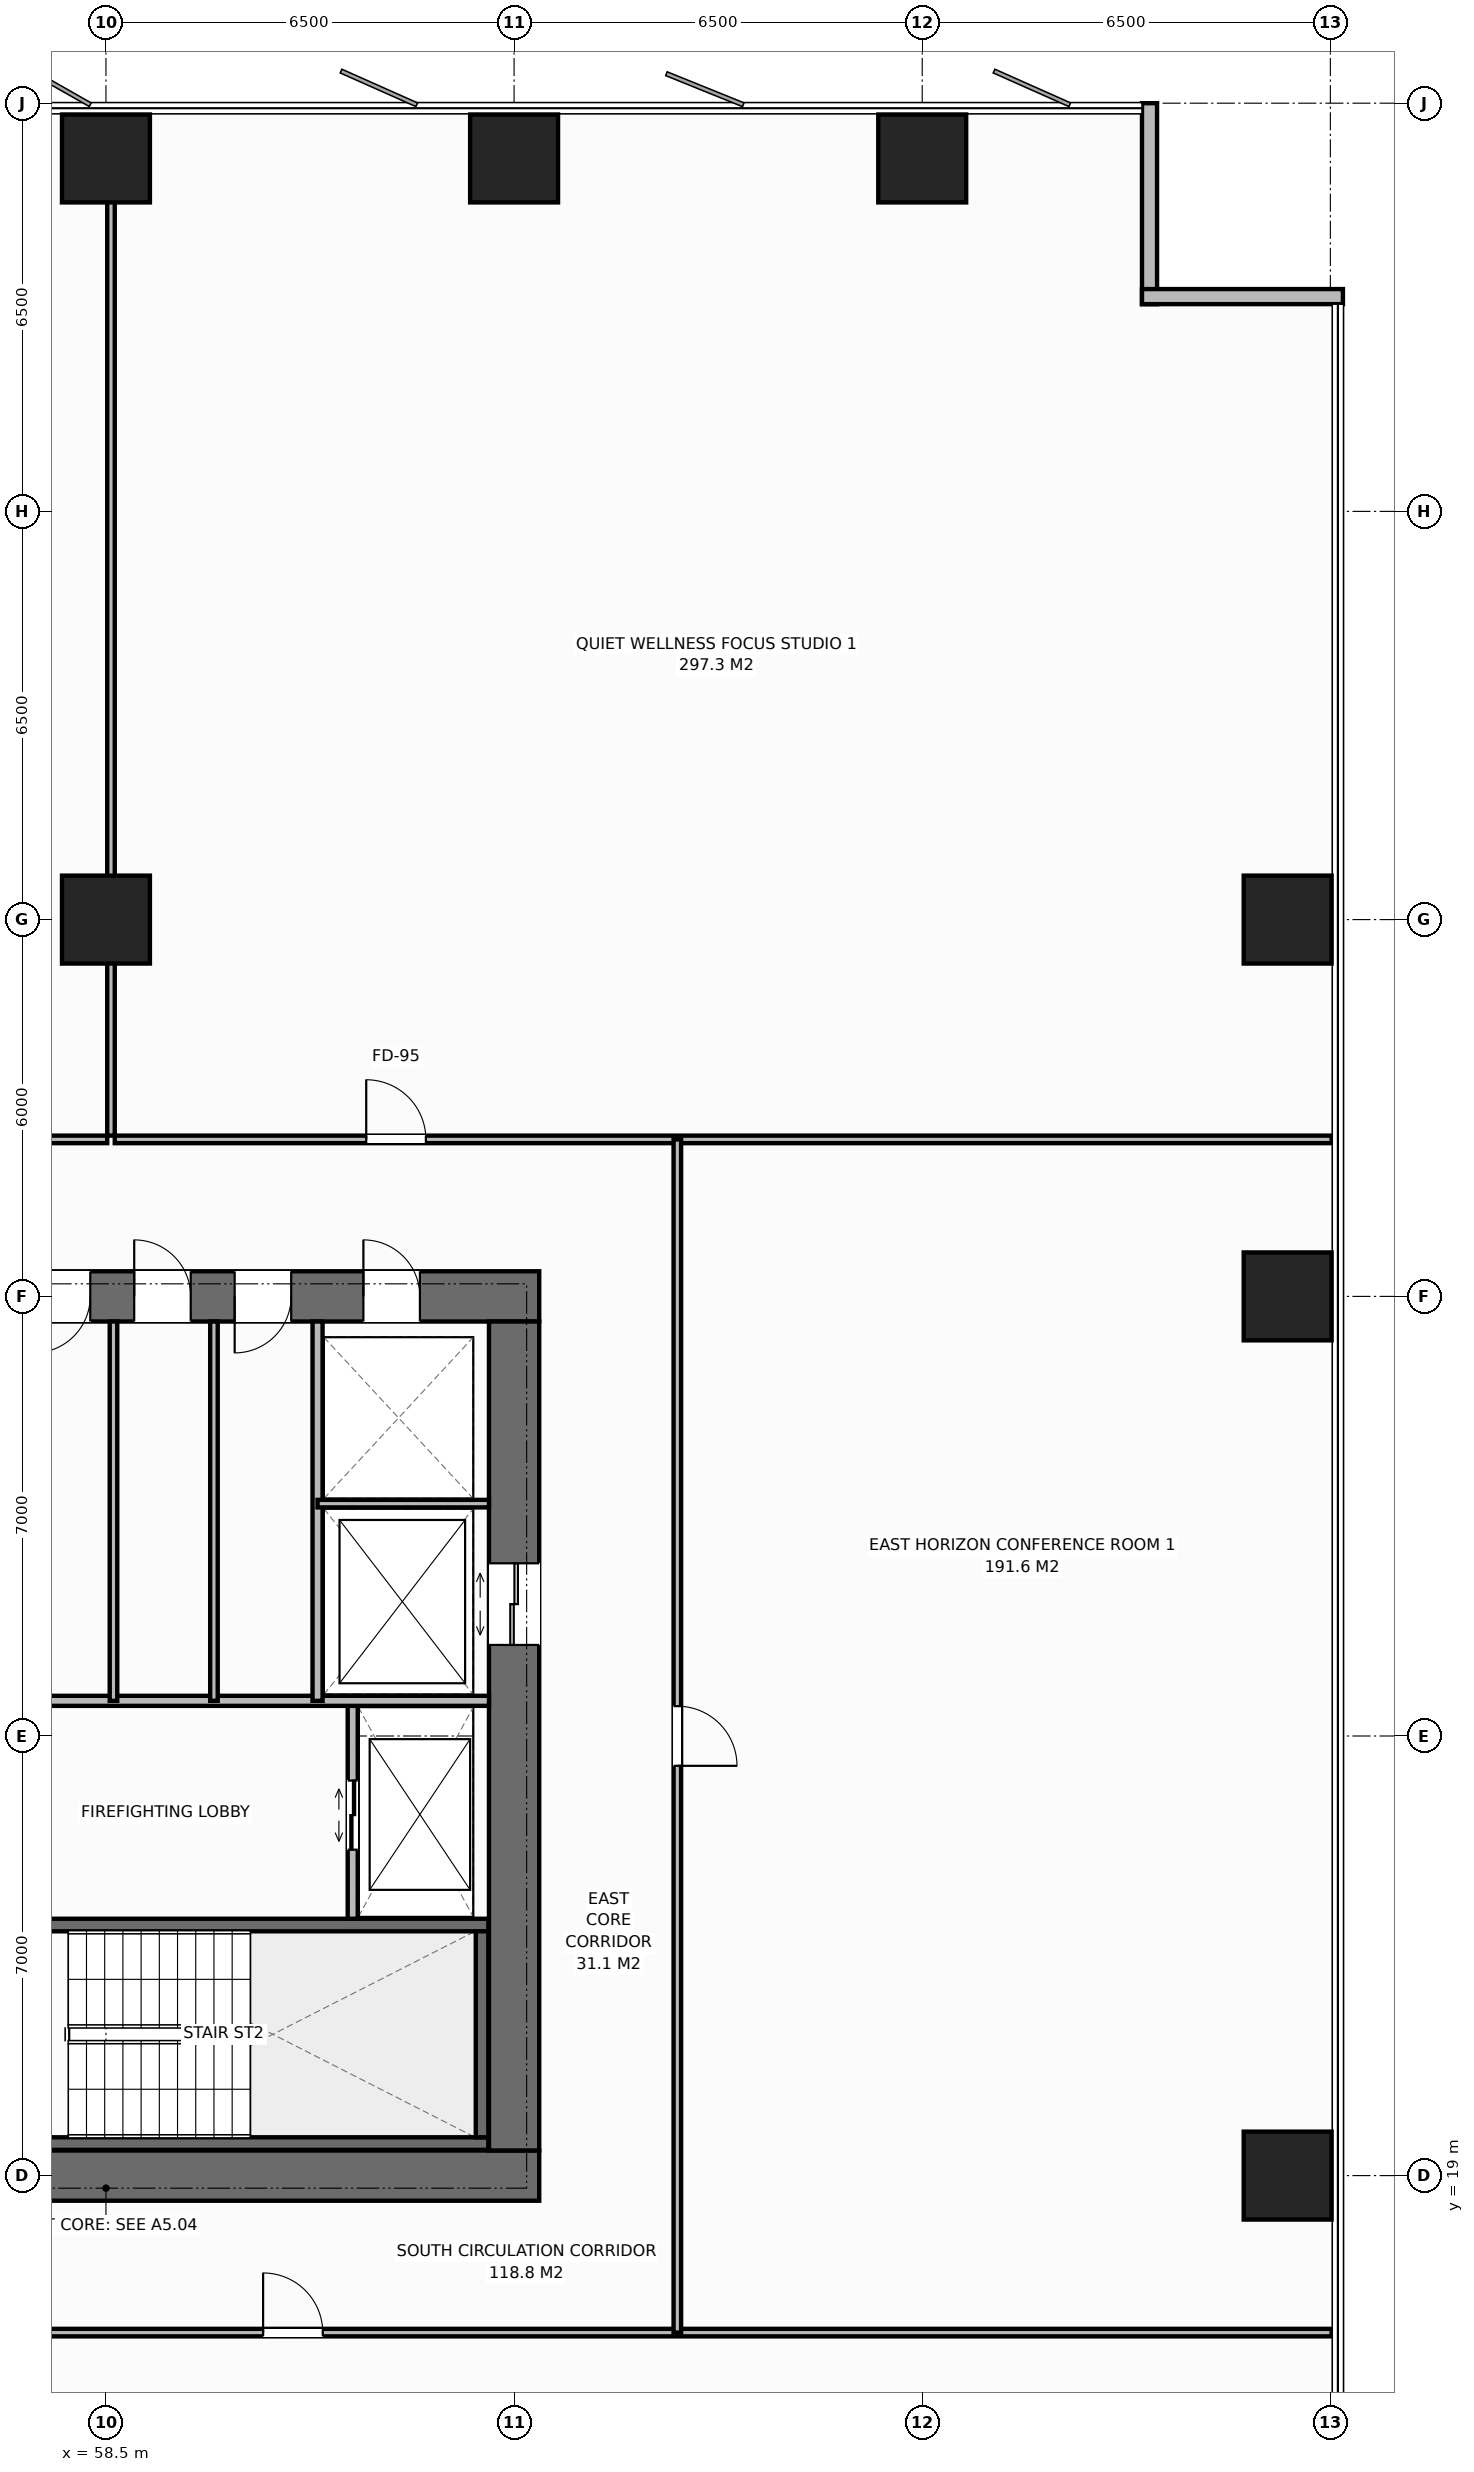
"""IFC4 building model, lengths in metres.
Left out: names, types, materials, properties, quantities, classifications, styles, units other than length and angle.
Written with IfcOpenShell. Run it as: python <this file> out.ifc"""

import sys

from ifc_helpers import new_model, si_unit, direction, frame, frame_2d, origin, origin_2d, place, context, subcontext, project, spatial, rectangle, extrude, element, fill, save


model = new_model("IFC4")
c1 = context("Model", 3, precision=1e-05, world=origin(), true_north=direction((0.0, 1.0)))
c2 = subcontext(c1, "Body", "Model", "MODEL_VIEW")
j1 = project(units=[si_unit("LENGTHUNIT", "METRE"), si_unit("PLANEANGLEUNIT", "RADIAN")], contexts=[c1])
p1 = place(None, origin())
s1 = spatial("IfcSite", under=j1, at=p1, CompositionType="ELEMENT")
p2 = place(p1, origin())
s2 = spatial("IfcBuilding", under=s1, at=p2, CompositionType="ELEMENT")
p3 = place(p2, frame((0.0, 0.0, 39.2)))
s3 = spatial("IfcBuildingStorey", under=s2, at=p3, CompositionType="ELEMENT", Elevation=39.2)
p4 = place(p3, frame((51.6, 19.0, 0.0), z_axis=(0.0, 0.0, 1.0), x_axis=(1.0, 0.0, 0.0)))
e1 = element("IfcWall", 1, at=p4, inside=s3, PredefinedType="SHEAR", context=c2, shape_type="SweptSolid", body=[
    extrude(rectangle(XDim=13.8, YDim=0.8, at=frame_2d((6.9, 0.0))), origin(), (0.0, 0.0, 1.0), 3.8),
])
p5 = place(p4, frame((3.12, 0.0, 0.0)))
e2 = element("IfcOpeningElement", 2, at=p5, cuts=e1, PredefinedType="OPENING", context=c2, shape_type="SweptSolid", body=[
    extrude(rectangle(XDim=1.4, YDim=2.2, at=frame_2d((0.7, 1.1))), frame((0.0, 0.41, 0.0), z_axis=(0.0, -1.0, 0.0), x_axis=(1.0, 0.0, 0.0)), (0.0, 0.0, 1.0), 0.82),
])
p6 = place(p3, frame((51.6, 33.0, 0.0), z_axis=(0.0, 0.0, 1.0), x_axis=(1.0, 0.0, 0.0)))
e3 = element("IfcWall", 3, at=p6, inside=s3, PredefinedType="SHEAR", context=c2, shape_type="SweptSolid", body=[
    extrude(rectangle(XDim=13.8, YDim=0.8, at=frame_2d((6.9, 0.0))), origin(), (0.0, 0.0, 1.0), 3.8),
])
p7 = place(p6, frame((3.12, 0.0, 0.0)))
e4 = element("IfcOpeningElement", 4, at=p7, cuts=e3, PredefinedType="OPENING", context=c2, shape_type="SweptSolid", body=[
    extrude(rectangle(XDim=1.4, YDim=2.2, at=frame_2d((0.7, 1.1))), frame((0.0, 0.41, 0.0), z_axis=(0.0, -1.0, 0.0), x_axis=(1.0, 0.0, 0.0)), (0.0, 0.0, 1.0), 0.82),
])
p8 = place(p6, frame((11.0, 0.0, 0.0)))
e5 = element("IfcOpeningElement", 5, at=p8, cuts=e3, PredefinedType="OPENING", context=c2, shape_type="SweptSolid", body=[
    extrude(rectangle(XDim=0.9, YDim=2.15, at=frame_2d((0.45, 1.075))), frame((0.0, 0.41, 0.0), z_axis=(0.0, -1.0, 0.0), x_axis=(1.0, 0.0, 0.0)), (0.0, 0.0, 1.0), 0.82),
])
p9 = place(p6, frame((5.75, 0.0, 0.0)))
e6 = element("IfcOpeningElement", 6, at=p9, cuts=e3, PredefinedType="OPENING", context=c2, shape_type="SweptSolid", body=[
    extrude(rectangle(XDim=0.9, YDim=2.15, at=frame_2d((0.45, 1.075))), frame((0.0, 0.41, 0.0), z_axis=(0.0, -1.0, 0.0), x_axis=(1.0, 0.0, 0.0)), (0.0, 0.0, 1.0), 0.82),
])
p10 = place(p6, frame((7.35, 0.0, 0.0)))
e7 = element("IfcOpeningElement", 7, at=p10, cuts=e3, PredefinedType="OPENING", context=c2, shape_type="SweptSolid", body=[
    extrude(rectangle(XDim=0.9, YDim=2.15, at=frame_2d((0.45, 1.075))), frame((0.0, 0.41, 0.0), z_axis=(0.0, -1.0, 0.0), x_axis=(1.0, 0.0, 0.0)), (0.0, 0.0, 1.0), 0.82),
])
p11 = place(p6, frame((8.95, 0.0, 0.0)))
e8 = element("IfcOpeningElement", 8, at=p11, cuts=e3, PredefinedType="OPENING", context=c2, shape_type="SweptSolid", body=[
    extrude(rectangle(XDim=0.9, YDim=2.15, at=frame_2d((0.45, 1.075))), frame((0.0, 0.41, 0.0), z_axis=(0.0, -1.0, 0.0), x_axis=(1.0, 0.0, 0.0)), (0.0, 0.0, 1.0), 0.82),
])
p12 = place(p3, frame((65.0, 19.4, 0.0), z_axis=(0.0, 0.0, 1.0), x_axis=(0.0, 1.0, 0.0)))
e9 = element("IfcWall", 9, at=p12, inside=s3, PredefinedType="SHEAR", context=c2, shape_type="SweptSolid", body=[
    extrude(rectangle(XDim=13.2, YDim=0.8, at=frame_2d((6.6, 0.0))), origin(), (0.0, 0.0, 1.0), 3.8),
])
p13 = place(p12, frame((8.05, 0.0, 0.0)))
e10 = element("IfcOpeningElement", 10, at=p13, cuts=e9, PredefinedType="OPENING", context=c2, shape_type="SweptSolid", body=[
    extrude(rectangle(XDim=1.3, YDim=2.2, at=frame_2d((0.65, 1.1))), frame((0.0, 0.41, 0.0), z_axis=(0.0, -1.0, 0.0), x_axis=(1.0, 0.0, 0.0)), (0.0, 0.0, 1.0), 0.82),
])
p14 = place(p3, frame((56.16, 19.51, 0.0), z_axis=(0.0, 0.0, 1.0), x_axis=(1.0, 0.0, 0.0)))
e11 = element("IfcWall", 11, at=p14, inside=s3, PredefinedType="SHEAR", context=c2, shape_type="SweptSolid", body=[
    extrude(rectangle(XDim=8.43, YDim=0.2, at=frame_2d((4.215, 0.0))), origin(), (0.0, 0.0, 1.0), 3.8),
])
p15 = place(p3, frame((56.16, 22.99, 0.0), z_axis=(0.0, 0.0, 1.0), x_axis=(1.0, 0.0, 0.0)))
e12 = element("IfcWall", 12, at=p15, inside=s3, PredefinedType="SHEAR", context=c2, shape_type="SweptSolid", body=[
    extrude(rectangle(XDim=8.43, YDim=0.2, at=frame_2d((4.215, 0.0))), origin(), (0.0, 0.0, 1.0), 3.8),
])
p16 = place(p15, frame((0.45, 0.0, 0.0)))
e13 = element("IfcOpeningElement", 13, at=p16, cuts=e12, PredefinedType="OPENING", context=c2, shape_type="SweptSolid", body=[
    extrude(rectangle(XDim=1.0, YDim=2.15, at=frame_2d((0.5, 1.075))), frame((0.0, 0.11, 0.0), z_axis=(0.0, -1.0, 0.0), x_axis=(1.0, 0.0, 0.0)), (0.0, 0.0, 1.0), 0.22),
])
p17 = place(p3, frame((64.49, 19.61, 0.0), z_axis=(0.0, 0.0, 1.0), x_axis=(0.0, 1.0, 0.0)))
e14 = element("IfcWall", 14, at=p17, inside=s3, PredefinedType="SHEAR", context=c2, shape_type="SweptSolid", body=[
    extrude(rectangle(XDim=3.28, YDim=0.2, at=frame_2d((1.64, 0.0))), origin(), (0.0, 0.0, 1.0), 3.8),
])
for number, where, z_axis, x_axis in (
    (15, (58.5, 39.0, 0.0), (0.0, 0.0, 1.0), (1.0, 0.0, 0.0)),
    (16, (58.5, 51.12, 0.0), (0.0, 0.0, 1.0), (1.0, 0.0, 0.0)),
    (17, (65.0, 51.12, 0.0), (0.0, 0.0, 1.0), (1.0, 0.0, 0.0)),
    (18, (71.5, 51.12, 0.0), (0.0, 0.0, 1.0), (1.0, 0.0, 0.0)),
    (19, (77.32, 19.0, 0.0), (0.0, 0.0, 1.0), (1.0, 0.0, 0.0)),
    (20, (77.32, 33.0, 0.0), (0.0, 0.0, 1.0), (1.0, 0.0, 0.0)),
    (21, (77.32, 39.0, 0.0), (0.0, 0.0, 1.0), (1.0, 0.0, 0.0)),
):
    element("IfcColumn", number, at=place(p3, frame(where, z_axis=z_axis, x_axis=x_axis)), inside=s3, PredefinedType="COLUMN", context=c2, shape_type="SweptSolid", body=[
        extrude(rectangle(XDim=1.4, YDim=1.4, at=origin_2d()), origin(), (0.0, 0.0, 1.0), 3.8),
    ])
for number, where, z_axis, x_axis in (
    (22, (75.12, 52.0, 0.0), (0.0, 0.0, 1.0), (0.0, -1.0, 0.0)),
    (23, (75.0, 48.92, 0.0), (0.0, 0.0, 1.0), (1.0, 0.0, 0.0)),
):
    element("IfcWall", number, at=place(p3, frame(where, z_axis=z_axis, x_axis=x_axis)), inside=s3, PredefinedType="STANDARD", context=c2, shape_type="SweptSolid", body=[
        extrude(rectangle(XDim=3.2, YDim=0.24, at=frame_2d((1.6, 0.0))), origin(), (0.0, 0.0, 1.0), 3.55),
    ])
p18 = place(p3, frame((62.43, 23.09, 0.0), z_axis=(0.0, 0.0, 1.0), x_axis=(0.0, 1.0, 0.0)))
e24 = element("IfcWall", 24, at=p18, inside=s3, PredefinedType="STANDARD", context=c2, shape_type="SweptSolid", body=[
    extrude(rectangle(XDim=3.47, YDim=0.16, at=frame_2d((1.735, 0.0))), origin(), (0.0, 0.0, 1.0), 3.55),
])
p19 = place(p18, frame((1.1, 0.0, 0.0)))
e25 = element("IfcOpeningElement", 25, at=p19, cuts=e24, PredefinedType="OPENING", context=c2, shape_type="SweptSolid", body=[
    extrude(rectangle(XDim=1.1, YDim=2.2, at=frame_2d((0.55, 1.1))), frame((0.0, 0.09, 0.0), z_axis=(0.0, -1.0, 0.0), x_axis=(1.0, 0.0, 0.0)), (0.0, 0.0, 1.0), 0.18),
])
p20 = place(p3, frame((56.26, 26.56, 0.0), z_axis=(0.0, 0.0, 1.0), x_axis=(1.0, 0.0, 0.0)))
e26 = element("IfcWall", 26, at=p20, inside=s3, PredefinedType="STANDARD", context=c2, shape_type="SweptSolid", body=[
    extrude(rectangle(XDim=8.34, YDim=0.16, at=frame_2d((4.17, 0.0))), origin(), (0.0, 0.0, 1.0), 3.55),
])
p21 = place(p3, frame((61.87, 26.56, 0.0), z_axis=(0.0, 0.0, 1.0), x_axis=(0.0, 1.0, 0.0)))
e27 = element("IfcWall", 27, at=p21, inside=s3, PredefinedType="STANDARD", context=c2, shape_type="SweptSolid", body=[
    extrude(rectangle(XDim=6.04, YDim=0.16, at=frame_2d((3.02, 0.0))), origin(), (0.0, 0.0, 1.0), 3.55),
])
p22 = place(p3, frame((61.87, 29.7, 0.0), z_axis=(0.0, 0.0, 1.0), x_axis=(1.0, 0.0, 0.0)))
e28 = element("IfcWall", 28, at=p22, inside=s3, PredefinedType="PARTITIONING", context=c2, shape_type="SweptSolid", body=[
    extrude(rectangle(XDim=2.73, YDim=0.12, at=frame_2d((1.365, 0.0))), origin(), (0.0, 0.0, 1.0), 3.55),
])
for number, where, z_axis, x_axis in (
    (29, (58.62, 26.56, 0.0), (0.0, 0.0, 1.0), (0.0, 1.0, 0.0)),
    (30, (60.22, 26.56, 0.0), (0.0, 0.0, 1.0), (0.0, 1.0, 0.0)),
):
    element("IfcWall", number, at=place(p3, frame(where, z_axis=z_axis, x_axis=x_axis)), inside=s3, PredefinedType="PARTITIONING", context=c2, shape_type="SweptSolid", body=[
        extrude(rectangle(XDim=6.04, YDim=0.12, at=frame_2d((3.02, 0.0))), origin(), (0.0, 0.0, 1.0), 3.55),
    ])
p23 = place(p3, frame((58.58, 35.56, 0.0), z_axis=(0.0, 0.0, 1.0), x_axis=(0.0, 1.0, 0.0)))
e31 = element("IfcWall", 31, at=p23, inside=s3, PredefinedType="PARTITIONING", context=c2, shape_type="SweptSolid", body=[
    extrude(rectangle(XDim=16.42, YDim=0.12, at=frame_2d((8.21, 0.0))), origin(), (0.0, 0.0, 1.0), 2.9),
])
p24 = place(p3, frame((35.462, 35.5, 0.0), z_axis=(0.0, 0.0, 1.0), x_axis=(1.0, 0.0, 0.0)))
e32 = element("IfcWall", 32, at=p24, inside=s3, PredefinedType="PARTITIONING", context=c2, shape_type="SweptSolid", body=[
    extrude(rectangle(XDim=23.058, YDim=0.12, at=frame_2d((11.529, 0.0))), origin(), (0.0, 0.0, 1.0), 3.55),
])
p25 = place(p24, frame((11.054, 0.0, 0.0)))
e33 = element("IfcOpeningElement", 33, at=p25, cuts=e32, PredefinedType="OPENING", context=c2, shape_type="SweptSolid", body=[
    extrude(rectangle(XDim=0.95, YDim=2.15, at=frame_2d((0.475, 1.075))), frame((0.0, 0.07, 0.0), z_axis=(0.0, -1.0, 0.0), x_axis=(1.0, 0.0, 0.0)), (0.0, 0.0, 1.0), 0.14),
])
p26 = place(p3, frame((58.64, 35.5, 0.0), z_axis=(0.0, 0.0, 1.0), x_axis=(1.0, 0.0, 0.0)))
e34 = element("IfcWall", 34, at=p26, inside=s3, PredefinedType="PARTITIONING", context=c2, shape_type="SweptSolid", body=[
    extrude(rectangle(XDim=19.38, YDim=0.12, at=frame_2d((9.69, 0.0))), origin(), (0.0, 0.0, 1.0), 3.55),
])
p27 = place(p26, frame((4.005, 0.0, 0.0)))
e35 = element("IfcOpeningElement", 35, at=p27, cuts=e34, PredefinedType="OPENING", context=c2, shape_type="SweptSolid", body=[
    extrude(rectangle(XDim=0.95, YDim=2.15, at=frame_2d((0.475, 1.075))), frame((0.0, 0.07, 0.0), z_axis=(0.0, -1.0, 0.0), x_axis=(1.0, 0.0, 0.0)), (0.0, 0.0, 1.0), 0.14),
])
p28 = place(p3, frame((55.356, 16.5, 0.0), z_axis=(0.0, 0.0, 1.0), x_axis=(1.0, 0.0, 0.0)))
e36 = element("IfcWall", 36, at=p28, inside=s3, PredefinedType="PARTITIONING", context=c2, shape_type="SweptSolid", body=[
    extrude(rectangle(XDim=22.664, YDim=0.12, at=frame_2d((11.332, 0.0))), origin(), (0.0, 0.0, 1.0), 3.55),
])
p29 = place(p28, frame((5.647, 0.0, 0.0)))
e37 = element("IfcOpeningElement", 37, at=p29, cuts=e36, PredefinedType="OPENING", context=c2, shape_type="SweptSolid", body=[
    extrude(rectangle(XDim=0.95, YDim=2.15, at=frame_2d((0.475, 1.075))), frame((0.0, 0.07, 0.0), z_axis=(0.0, -1.0, 0.0), x_axis=(1.0, 0.0, 0.0)), (0.0, 0.0, 1.0), 0.14),
])
p30 = place(p3, frame((67.6, 16.5, 0.0), z_axis=(0.0, 0.0, 1.0), x_axis=(0.0, 1.0, 0.0)))
e38 = element("IfcWall", 38, at=p30, inside=s3, PredefinedType="PARTITIONING", context=c2, shape_type="SweptSolid", body=[
    extrude(rectangle(XDim=19.0, YDim=0.12, at=frame_2d((9.5, 0.0))), origin(), (0.0, 0.0, 1.0), 3.55),
])
p31 = place(p30, frame((9.025, 0.0, 0.0)))
e39 = element("IfcOpeningElement", 39, at=p31, cuts=e38, PredefinedType="OPENING", context=c2, shape_type="SweptSolid", body=[
    extrude(rectangle(XDim=0.95, YDim=2.15, at=frame_2d((0.475, 1.075))), frame((0.0, 0.07, 0.0), z_axis=(0.0, -1.0, 0.0), x_axis=(1.0, 0.0, 0.0)), (0.0, 0.0, 1.0), 0.14),
])
p32 = place(p19, origin())
e40 = element("IfcDoor", 40, at=p32, inside=s3, OperationType="DOUBLE_DOOR_SLIDING", PredefinedType="DOOR", context=c2, shape_type="SweptSolid", body=[
    extrude(rectangle(XDim=1.1, YDim=2.2, at=frame_2d((0.55, 1.1))), frame((0.0, 0.025, 0.0), z_axis=(0.0, -1.0, 0.0), x_axis=(1.0, 0.0, 0.0)), (0.0, 0.0, 1.0), 0.05),
])
fill(e25, e40)
p33 = place(p13, origin())
e41 = element("IfcDoor", 41, at=p33, inside=s3, OperationType="DOUBLE_DOOR_SLIDING", PredefinedType="DOOR", context=c2, shape_type="SweptSolid", body=[
    extrude(rectangle(XDim=1.3, YDim=2.2, at=frame_2d((0.65, 1.1))), frame((0.0, 0.025, 0.0), z_axis=(0.0, -1.0, 0.0), x_axis=(1.0, 0.0, 0.0)), (0.0, 0.0, 1.0), 0.05),
])
fill(e10, e41)
p34 = place(p8, origin())
e42 = element("IfcDoor", 42, at=p34, inside=s3, OperationType="SINGLE_SWING_LEFT", PredefinedType="DOOR", context=c2, shape_type="SweptSolid", body=[
    extrude(rectangle(XDim=0.9, YDim=2.15, at=frame_2d((0.45, 1.075))), frame((0.0, -0.075, 0.0), z_axis=(0.0, -1.0, 0.0), x_axis=(1.0, 0.0, 0.0)), (0.0, 0.0, 1.0), 0.05),
])
fill(e5, e42)
p35 = place(p9, origin())
e43 = element("IfcDoor", 43, at=p35, inside=s3, OperationType="SINGLE_SWING_RIGHT", PredefinedType="DOOR", context=c2, shape_type="SweptSolid", body=[
    extrude(rectangle(XDim=0.9, YDim=2.15, at=frame_2d((0.45, 1.075))), frame((0.0, -0.075, 0.0), z_axis=(0.0, -1.0, 0.0), x_axis=(1.0, 0.0, 0.0)), (0.0, 0.0, 1.0), 0.05),
])
fill(e6, e43)
p36 = place(p10, origin())
e44 = element("IfcDoor", 44, at=p36, inside=s3, OperationType="SINGLE_SWING_LEFT", PredefinedType="DOOR", context=c2, shape_type="SweptSolid", body=[
    extrude(rectangle(XDim=0.9, YDim=2.15, at=frame_2d((0.45, 1.075))), frame((0.0, -0.075, 0.0), z_axis=(0.0, -1.0, 0.0), x_axis=(1.0, 0.0, 0.0)), (0.0, 0.0, 1.0), 0.05),
])
fill(e7, e44)
p37 = place(p11, origin())
e45 = element("IfcDoor", 45, at=p37, inside=s3, OperationType="SINGLE_SWING_RIGHT", PredefinedType="DOOR", context=c2, shape_type="SweptSolid", body=[
    extrude(rectangle(XDim=0.9, YDim=2.15, at=frame_2d((0.45, 1.075))), frame((0.0, -0.075, 0.0), z_axis=(0.0, -1.0, 0.0), x_axis=(1.0, 0.0, 0.0)), (0.0, 0.0, 1.0), 0.05),
])
fill(e8, e45)
p38 = place(p27, origin())
e46 = element("IfcDoor", 46, at=p38, inside=s3, OperationType="SINGLE_SWING_LEFT", PredefinedType="DOOR", context=c2, shape_type="SweptSolid", body=[
    extrude(rectangle(XDim=0.95, YDim=2.15, at=frame_2d((0.475, 1.075))), frame((0.0, 0.025, 0.0), z_axis=(0.0, -1.0, 0.0), x_axis=(1.0, 0.0, 0.0)), (0.0, 0.0, 1.0), 0.05),
])
fill(e35, e46)
p39 = place(p29, origin())
e47 = element("IfcDoor", 47, at=p39, inside=s3, OperationType="SINGLE_SWING_LEFT", PredefinedType="DOOR", context=c2, shape_type="SweptSolid", body=[
    extrude(rectangle(XDim=0.95, YDim=2.15, at=frame_2d((0.475, 1.075))), frame((0.0, 0.025, 0.0), z_axis=(0.0, -1.0, 0.0), x_axis=(1.0, 0.0, 0.0)), (0.0, 0.0, 1.0), 0.05),
])
fill(e37, e47)
p40 = place(p31, origin())
e48 = element("IfcDoor", 48, at=p40, inside=s3, OperationType="SINGLE_SWING_RIGHT", PredefinedType="DOOR", context=c2, shape_type="SweptSolid", body=[
    extrude(rectangle(XDim=0.95, YDim=2.15, at=frame_2d((0.475, 1.075))), frame((0.0, 0.025, 0.0), z_axis=(0.0, -1.0, 0.0), x_axis=(1.0, 0.0, 0.0)), (0.0, 0.0, 1.0), 0.05),
])
fill(e39, e48)
save(model, sys.argv[1])
